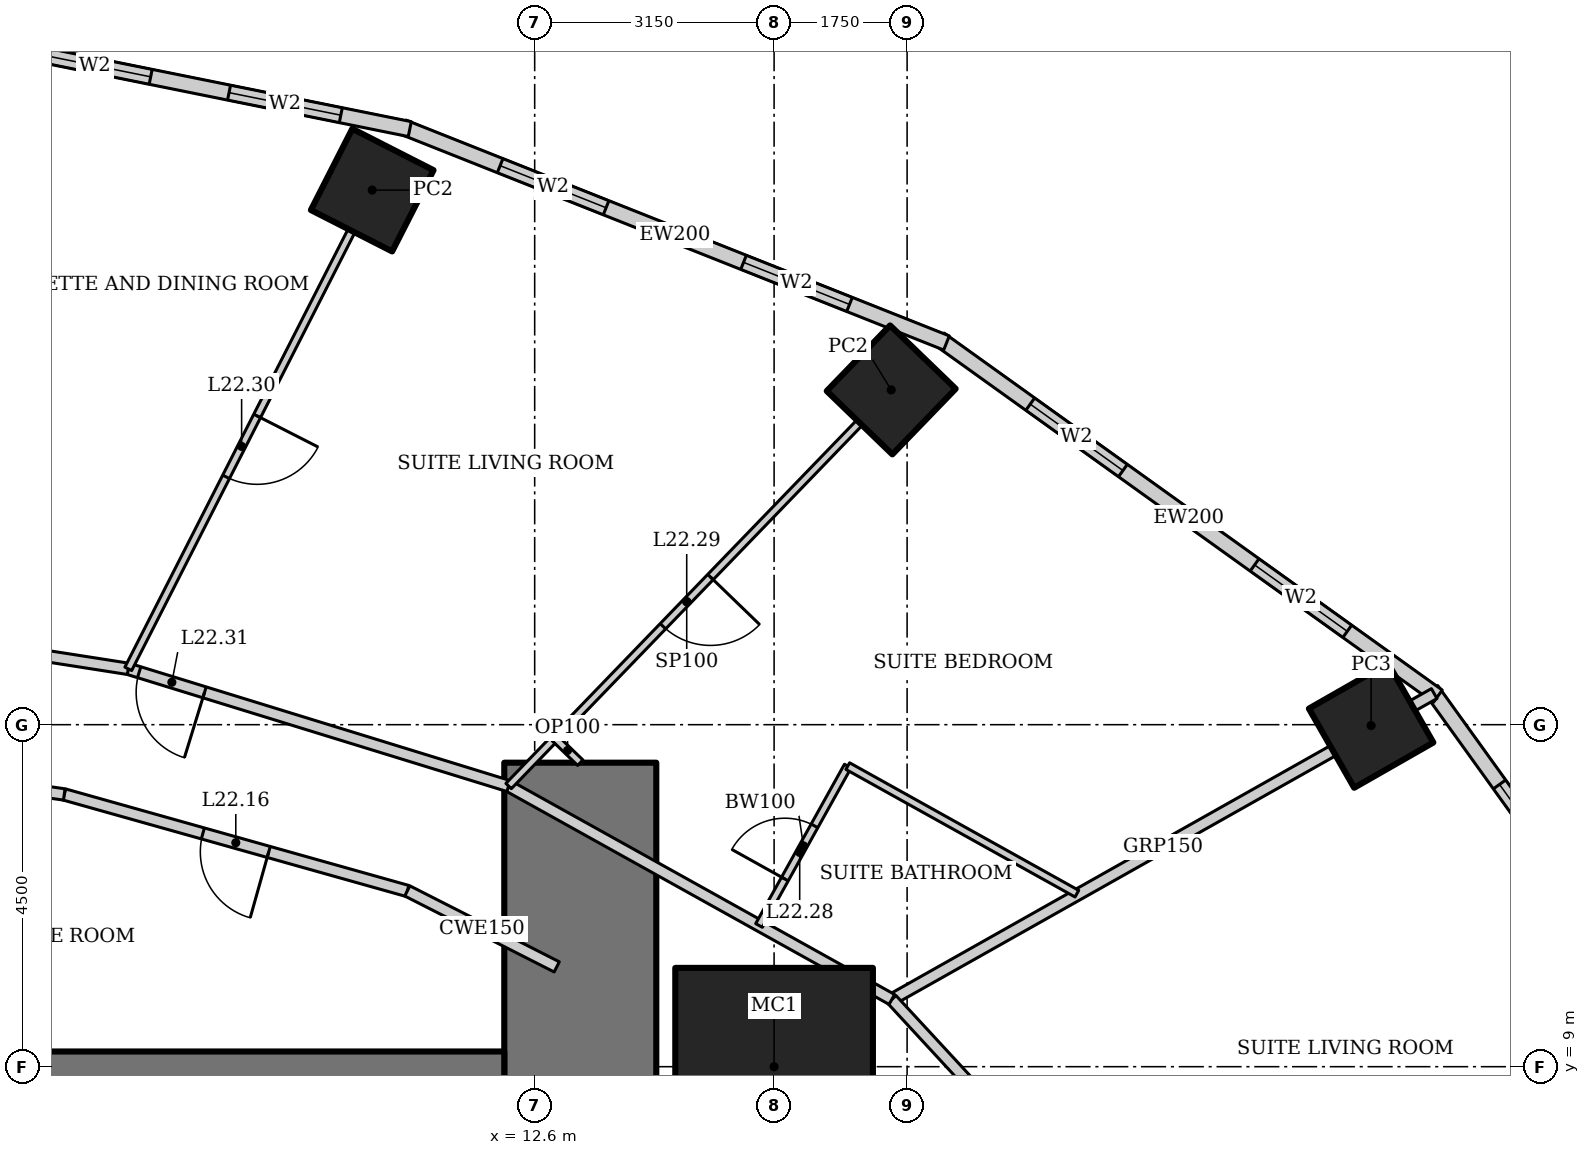
"""IFC4 building model, lengths in metres.
Left out: names, types, materials, properties, quantities, classifications, styles, units other than length and angle.
Written with IfcOpenShell. Run it as: python <this file> out.ifc"""

import sys

from ifc_helpers import new_model, si_unit, direction, frame, frame_2d, origin, origin_2d, place, context, subcontext, project, spatial, rectangle, hollow_rectangle, extrude, element, fill, save


model = new_model("IFC4")
c1 = context("Model", 3, precision=1e-05, world=origin(), true_north=direction((0.0, 1.0)))
c2 = subcontext(c1, "Body", "Model", "MODEL_VIEW")
j1 = project(units=[si_unit("LENGTHUNIT", "METRE"), si_unit("PLANEANGLEUNIT", "RADIAN")], contexts=[c1])
p1 = place(None, origin())
s1 = spatial("IfcSite", under=j1, at=p1, CompositionType="ELEMENT")
p2 = place(p1, origin())
s2 = spatial("IfcBuilding", under=s1, at=p2, CompositionType="ELEMENT")
p3 = place(p2, frame((0.0, 0.0, 94.6)))
s3 = spatial("IfcBuildingStorey", under=s2, at=p3, CompositionType="ELEMENT", Elevation=94.6)
p4 = place(p3, frame((15.75, 9.0, 0.0), z_axis=(0.0, 0.0, 1.0), x_axis=(1.0, 0.0, 0.0)))
e1 = element("IfcColumn", 1, at=p4, inside=s3, PredefinedType="COLUMN", context=c2, shape_type="SweptSolid", body=[
    extrude(hollow_rectangle(XDim=2.6, YDim=2.6, WallThickness=0.13, at=origin_2d()), origin(), (0.0, 0.0, 1.0), 3.6),
])
p5 = place(p3, frame((23.605, 13.489, 0.0), z_axis=(0.0, 0.0, 1.0), x_axis=(0.86824298017, 0.496139221777, 0.0)))
e2 = element("IfcColumn", 2, at=p5, inside=s3, PredefinedType="COLUMN", context=c2, shape_type="SweptSolid", body=[
    extrude(hollow_rectangle(XDim=1.2, YDim=1.2, WallThickness=0.12, at=origin_2d()), origin(), (0.0, 0.0, 1.0), 3.6),
])
for number, where, z_axis, x_axis in (
    (3, (17.291, 17.905, 0.0), (0.0, 0.0, 1.0), (0.695, 0.719, 0.0)),
    (4, (10.463, 20.534, 0.0), (0.0, 0.0, 1.0), (0.454, 0.891, 0.0)),
):
    element("IfcColumn", number, at=place(p3, frame(where, z_axis=z_axis, x_axis=x_axis)), inside=s3, PredefinedType="COLUMN", context=c2, shape_type="SweptSolid", body=[
        extrude(hollow_rectangle(XDim=1.2, YDim=1.2, WallThickness=0.1, at=origin_2d()), origin(), (0.0, 0.0, 1.0), 3.6),
    ])
p6 = place(p3, frame((13.2, -13.0, 0.0), z_axis=(0.0, 0.0, 1.0), x_axis=(0.0, 1.0, 0.0)))
e5 = element("IfcWall", 5, at=p6, inside=s3, PredefinedType="SHEAR", context=c2, shape_type="SweptSolid", body=[
    extrude(rectangle(XDim=26.0, YDim=2.0, at=frame_2d((13.0, 0.0))), origin(), (0.0, 0.0, 1.0), 3.6),
])
p7 = place(p6, frame((12.1, 0.0, 0.0)))
e6 = element("IfcOpeningElement", 6, at=p7, cuts=e5, PredefinedType="OPENING", context=c2, shape_type="SweptSolid", body=[
    extrude(rectangle(XDim=1.8, YDim=2.1, at=frame_2d((0.9, 1.05))), frame((0.0, 1.01, 0.0), z_axis=(0.0, -1.0, 0.0), x_axis=(1.0, 0.0, 0.0)), (0.0, 0.0, 1.0), 2.02),
])
p8 = place(p3, frame((12.2, 8.0, 0.0), z_axis=(0.0, 0.0, 1.0), x_axis=(-1.0, 0.0, 0.0)))
e7 = element("IfcWall", 7, at=p8, inside=s3, PredefinedType="SHEAR", context=c2, shape_type="SweptSolid", body=[
    extrude(rectangle(XDim=24.4, YDim=2.4, at=frame_2d((12.2, 0.0))), origin(), (0.0, 0.0, 1.0), 3.6),
])
p9 = place(p3, frame((29.26, 7.2, 0.0), z_axis=(0.0, 0.0, 1.0), x_axis=(-0.583937613703, 0.811798536155, 0.0)))
e8 = element("IfcWall", 8, at=p9, inside=s3, PredefinedType="SOLIDWALL", context=c2, shape_type="SweptSolid", body=[
    extrude(rectangle(XDim=8.323, YDim=0.2, at=frame_2d((4.162, 0.0))), origin(), (0.0, 0.0, 1.0), 3.45),
])
p10 = place(p9, frame((1.531, 0.0, 0.5)))
e9 = element("IfcOpeningElement", 9, at=p10, cuts=e8, PredefinedType="OPENING", context=c2, shape_type="SweptSolid", body=[
    extrude(rectangle(XDim=1.5, YDim=2.2, at=frame_2d((0.75, 1.1))), frame((0.0, 0.11, 0.0), z_axis=(0.0, -1.0, 0.0), x_axis=(1.0, 0.0, 0.0)), (0.0, 0.0, 1.0), 0.22),
])
p11 = place(p9, frame((5.292, 0.0, 0.5)))
e10 = element("IfcOpeningElement", 10, at=p11, cuts=e8, PredefinedType="OPENING", context=c2, shape_type="SweptSolid", body=[
    extrude(rectangle(XDim=1.5, YDim=2.2, at=frame_2d((0.75, 1.1))), frame((0.0, 0.11, 0.0), z_axis=(0.0, -1.0, 0.0), x_axis=(1.0, 0.0, 0.0)), (0.0, 0.0, 1.0), 0.22),
])
p12 = place(p3, frame((24.482, 13.875, 0.0), z_axis=(0.0, 0.0, 1.0), x_axis=(-0.812791321576, 0.582554948112, 0.0)))
e11 = element("IfcWall", 11, at=p12, inside=s3, PredefinedType="SOLIDWALL", context=c2, shape_type="SweptSolid", body=[
    extrude(rectangle(XDim=8.063, YDim=0.2, at=frame_2d((4.032, 0.0))), origin(), (0.0, 0.0, 1.0), 3.45),
])
p13 = place(p12, frame((1.466, 0.0, 0.5)))
e12 = element("IfcOpeningElement", 12, at=p13, cuts=e11, PredefinedType="OPENING", context=c2, shape_type="SweptSolid", body=[
    extrude(rectangle(XDim=1.5, YDim=2.2, at=frame_2d((0.75, 1.1))), frame((0.0, 0.11, 0.0), z_axis=(0.0, -1.0, 0.0), x_axis=(1.0, 0.0, 0.0)), (0.0, 0.0, 1.0), 0.22),
])
p14 = place(p12, frame((5.097, 0.0, 0.5)))
e13 = element("IfcOpeningElement", 13, at=p14, cuts=e11, PredefinedType="OPENING", context=c2, shape_type="SweptSolid", body=[
    extrude(rectangle(XDim=1.5, YDim=2.2, at=frame_2d((0.75, 1.1))), frame((0.0, 0.11, 0.0), z_axis=(0.0, -1.0, 0.0), x_axis=(1.0, 0.0, 0.0)), (0.0, 0.0, 1.0), 0.22),
])
p15 = place(p3, frame((18.018, 18.523, 0.0), z_axis=(0.0, 0.0, 1.0), x_axis=(-0.929358351251, 0.369178892895, 0.0)))
e14 = element("IfcWall", 14, at=p15, inside=s3, PredefinedType="SOLIDWALL", context=c2, shape_type="SweptSolid", body=[
    extrude(rectangle(XDim=7.692, YDim=0.2, at=frame_2d((3.846, 0.0))), origin(), (0.0, 0.0, 1.0), 3.45),
])
p16 = place(p15, frame((1.373, 0.0, 0.5)))
e15 = element("IfcOpeningElement", 15, at=p16, cuts=e14, PredefinedType="OPENING", context=c2, shape_type="SweptSolid", body=[
    extrude(rectangle(XDim=1.5, YDim=2.2, at=frame_2d((0.75, 1.1))), frame((0.0, 0.11, 0.0), z_axis=(0.0, -1.0, 0.0), x_axis=(1.0, 0.0, 0.0)), (0.0, 0.0, 1.0), 0.22),
])
p17 = place(p15, frame((4.819, 0.0, 0.5)))
e16 = element("IfcOpeningElement", 16, at=p17, cuts=e14, PredefinedType="OPENING", context=c2, shape_type="SweptSolid", body=[
    extrude(rectangle(XDim=1.5, YDim=2.2, at=frame_2d((0.75, 1.1))), frame((0.0, 0.11, 0.0), z_axis=(0.0, -1.0, 0.0), x_axis=(1.0, 0.0, 0.0)), (0.0, 0.0, 1.0), 0.22),
])
p18 = place(p3, frame((10.957, 21.337, 0.0), z_axis=(0.0, 0.0, 1.0), x_axis=(-0.980251657452, 0.197754110105, 0.0)))
e17 = element("IfcWall", 17, at=p18, inside=s3, PredefinedType="SOLIDWALL", context=c2, shape_type="SweptSolid", body=[
    extrude(rectangle(XDim=5.904, YDim=0.2, at=frame_2d((2.952, 0.0))), origin(), (0.0, 0.0, 1.0), 3.45),
])
p19 = place(p18, frame((0.926, 0.0, 0.5)))
e18 = element("IfcOpeningElement", 18, at=p19, cuts=e17, PredefinedType="OPENING", context=c2, shape_type="SweptSolid", body=[
    extrude(rectangle(XDim=1.5, YDim=2.2, at=frame_2d((0.75, 1.1))), frame((0.0, 0.11, 0.0), z_axis=(0.0, -1.0, 0.0), x_axis=(1.0, 0.0, 0.0)), (0.0, 0.0, 1.0), 0.22),
])
p20 = place(p18, frame((3.478, 0.0, 0.5)))
e19 = element("IfcOpeningElement", 19, at=p20, cuts=e17, PredefinedType="OPENING", context=c2, shape_type="SweptSolid", body=[
    extrude(rectangle(XDim=1.5, YDim=2.2, at=frame_2d((0.75, 1.1))), frame((0.0, 0.11, 0.0), z_axis=(0.0, -1.0, 0.0), x_axis=(1.0, 0.0, 0.0)), (0.0, 0.0, 1.0), 0.22),
])
p21 = place(p3, frame((24.435, 13.909, 0.0), z_axis=(0.0, 0.0, 1.0), x_axis=(-0.871075246657, -0.491149584813, 0.0)))
e20 = element("IfcWall", 20, at=p21, inside=s3, PredefinedType="PARTITIONING", context=c2, shape_type="SweptSolid", body=[
    extrude(rectangle(XDim=8.192, YDim=0.15, at=frame_2d((4.096, 0.0))), origin(), (0.0, 0.0, 1.0), 2.693),
])
p22 = place(p3, frame((21.484, 5.356, 0.0), z_axis=(0.0, 0.0, 1.0), x_axis=(-0.678641806296, 0.734469399463, 0.0)))
e21 = element("IfcWall", 21, at=p22, inside=s3, PredefinedType="PARTITIONING", context=c2, shape_type="SweptSolid", body=[
    extrude(rectangle(XDim=6.166, YDim=0.15, at=frame_2d((3.083, 0.0))), origin(), (0.0, 0.0, 1.0), 3.45),
])
p23 = place(p22, frame((0.15, 0.0, 0.0)))
e22 = element("IfcOpeningElement", 22, at=p23, cuts=e21, PredefinedType="OPENING", context=c2, shape_type="SweptSolid", body=[
    extrude(rectangle(XDim=0.9, YDim=2.1, at=frame_2d((0.45, 1.05))), frame((0.0, 0.085, 0.0), z_axis=(0.0, -1.0, 0.0), x_axis=(1.0, 0.0, 0.0)), (0.0, 0.0, 1.0), 0.17),
])
p24 = place(p3, frame((17.299, 9.885, 0.0), z_axis=(0.0, 0.0, 1.0), x_axis=(-0.873695910579, 0.486472461541, 0.0)))
e23 = element("IfcWall", 23, at=p24, inside=s3, PredefinedType="PARTITIONING", context=c2, shape_type="SweptSolid", body=[
    extrude(rectangle(XDim=5.771, YDim=0.15, at=frame_2d((2.885, 0.0))), origin(), (0.0, 0.0, 1.0), 3.45),
])
p25 = place(p3, frame((12.257, 12.693, 0.0), z_axis=(0.0, 0.0, 1.0), x_axis=(-0.955657956744, 0.294478980085, 0.0)))
e24 = element("IfcWall", 24, at=p25, inside=s3, PredefinedType="PARTITIONING", context=c2, shape_type="SweptSolid", body=[
    extrude(rectangle(XDim=5.236, YDim=0.15, at=frame_2d((2.618, 0.0))), origin(), (0.0, 0.0, 1.0), 3.45),
])
p26 = place(p25, frame((4.186, 0.0, 0.0)))
e25 = element("IfcOpeningElement", 25, at=p26, cuts=e24, PredefinedType="OPENING", context=c2, shape_type="SweptSolid", body=[
    extrude(rectangle(XDim=0.9, YDim=2.1, at=frame_2d((0.45, 1.05))), frame((0.0, 0.085, 0.0), z_axis=(0.0, -1.0, 0.0), x_axis=(1.0, 0.0, 0.0)), (0.0, 0.0, 1.0), 0.17),
])
p27 = place(p3, frame((7.253, 14.235, 0.0), z_axis=(0.0, 0.0, 1.0), x_axis=(-0.988015036573, 0.154357660987, 0.0)))
e26 = element("IfcWall", 26, at=p27, inside=s3, PredefinedType="PARTITIONING", context=c2, shape_type="SweptSolid", body=[
    extrude(rectangle(XDim=3.875, YDim=0.15, at=frame_2d((1.938, 0.0))), origin(), (0.0, 0.0, 1.0), 3.45),
])
p28 = place(p3, frame((10.924, 11.312, 0.0), z_axis=(0.0, 0.0, 1.0), x_axis=(-0.962643729928, 0.270771211967, 0.0)))
e27 = element("IfcWall", 27, at=p28, inside=s3, PredefinedType="PARTITIONING", context=c2, shape_type="SweptSolid", body=[
    extrude(rectangle(XDim=4.688, YDim=0.15, at=frame_2d((2.344, 0.0))), origin(), (0.0, 0.0, 1.0), 3.45),
])
p29 = place(p28, frame((1.894, 0.0, 0.0)))
e28 = element("IfcOpeningElement", 28, at=p29, cuts=e27, PredefinedType="OPENING", context=c2, shape_type="SweptSolid", body=[
    extrude(rectangle(XDim=0.9, YDim=2.1, at=frame_2d((0.45, 1.05))), frame((0.0, 0.085, 0.0), z_axis=(0.0, -1.0, 0.0), x_axis=(1.0, 0.0, 0.0)), (0.0, 0.0, 1.0), 0.17),
])
p30 = place(p3, frame((6.411, 12.582, 0.0), z_axis=(0.0, 0.0, 1.0), x_axis=(-0.990002114939, 0.14105251652, 0.0)))
e29 = element("IfcWall", 29, at=p30, inside=s3, PredefinedType="PARTITIONING", context=c2, shape_type="SweptSolid", body=[
    extrude(rectangle(XDim=3.429, YDim=0.15, at=frame_2d((1.714, 0.0))), origin(), (0.0, 0.0, 1.0), 3.45),
])
p31 = place(p3, frame((15.552, 10.858, 0.0), z_axis=(0.0, 0.0, 1.0), x_axis=(0.486445964861, 0.873710663361, 0.0)))
e30 = element("IfcWall", 30, at=p31, inside=s3, PredefinedType="PARTITIONING", context=c2, shape_type="SweptSolid", body=[
    extrude(rectangle(XDim=2.4, YDim=0.1, at=frame_2d((1.2, 0.0))), origin(), (0.0, 0.0, 1.0), 3.45),
])
p32 = place(p31, frame((0.7, 0.0, 0.0)))
e31 = element("IfcOpeningElement", 31, at=p32, cuts=e30, PredefinedType="OPENING", context=c2, shape_type="SweptSolid", body=[
    extrude(rectangle(XDim=0.8, YDim=2.1, at=frame_2d((0.4, 1.05))), frame((0.0, 0.06, 0.0), z_axis=(0.0, -1.0, 0.0), x_axis=(1.0, 0.0, 0.0)), (0.0, 0.0, 1.0), 0.12),
])
p33 = place(p3, frame((16.719, 12.955, 0.0), z_axis=(0.0, 0.0, 1.0), x_axis=(0.873676251648, -0.486507766953, 0.0)))
e32 = element("IfcWall", 32, at=p33, inside=s3, PredefinedType="PARTITIONING", context=c2, shape_type="SweptSolid", body=[
    extrude(rectangle(XDim=3.45, YDim=0.1, at=frame_2d((1.725, 0.0))), origin(), (0.0, 0.0, 1.0), 3.45),
])
p34 = place(p3, frame((16.944, 17.545, 0.0), z_axis=(0.0, 0.0, 1.0), x_axis=(-0.694677175107, -0.719321640426, 0.0)))
e33 = element("IfcWall", 33, at=p34, inside=s3, PredefinedType="PARTITIONING", context=c2, shape_type="SweptSolid", body=[
    extrude(rectangle(XDim=6.746, YDim=0.1, at=frame_2d((3.373, 0.0))), origin(), (0.0, 0.0, 1.0), 2.528),
])
p35 = place(p34, frame((2.923, 0.0, 0.0)))
e34 = element("IfcOpeningElement", 34, at=p35, cuts=e33, PredefinedType="OPENING", context=c2, shape_type="SweptSolid", body=[
    extrude(rectangle(XDim=0.9, YDim=2.1, at=frame_2d((0.45, 1.05))), frame((0.0, 0.06, 0.0), z_axis=(0.0, -1.0, 0.0), x_axis=(1.0, 0.0, 0.0)), (0.0, 0.0, 1.0), 0.12),
])
p36 = place(p3, frame((10.236, 20.088, 0.0), z_axis=(0.0, 0.0, 1.0), x_axis=(-0.453993694696, -0.89100489627, 0.0)))
e35 = element("IfcWall", 35, at=p36, inside=s3, PredefinedType="PARTITIONING", context=c2, shape_type="SweptSolid", body=[
    extrude(rectangle(XDim=6.57, YDim=0.1, at=frame_2d((3.285, 0.0))), origin(), (0.0, 0.0, 1.0), 2.528),
])
p37 = place(p36, frame((2.835, 0.0, 0.0)))
e36 = element("IfcOpeningElement", 36, at=p37, cuts=e35, PredefinedType="OPENING", context=c2, shape_type="SweptSolid", body=[
    extrude(rectangle(XDim=0.9, YDim=2.1, at=frame_2d((0.45, 1.05))), frame((0.0, 0.06, 0.0), z_axis=(0.0, -1.0, 0.0), x_axis=(1.0, 0.0, 0.0)), (0.0, 0.0, 1.0), 0.12),
])
p38 = place(p3, frame((13.2, 13.0, 0.0), z_axis=(0.0, 0.0, 1.0), x_axis=(-0.719347134512, 0.69465077562, 0.0)))
e37 = element("IfcWall", 37, at=p38, inside=s3, PredefinedType="PARTITIONING", context=c2, shape_type="SweptSolid", body=[
    extrude(rectangle(XDim=0.465, YDim=0.1, at=frame_2d((0.232, 0.0))), origin(), (0.0, 0.0, 1.0), 3.45),
])
p39 = place(p3, frame((12.89, 10.313, 0.0), z_axis=(0.0, 0.0, 1.0), x_axis=(-0.891372999417, 0.453270532805, 0.0)))
e38 = element("IfcWall", 38, at=p39, inside=s3, PredefinedType="PARTITIONING", context=c2, shape_type="SweptSolid", body=[
    extrude(rectangle(XDim=2.205, YDim=0.15, at=frame_2d((1.103, 0.0))), origin(), (0.0, 0.0, 1.0), 3.45),
])
p40 = place(p11, origin())
e39 = element("IfcWindow", 39, at=p40, inside=s3, PartitioningType="SINGLE_PANEL", PredefinedType="WINDOW", context=c2, shape_type="SweptSolid", body=[
    extrude(rectangle(XDim=1.5, YDim=2.2, at=frame_2d((0.75, 1.1))), frame((0.0, 0.03, 0.0), z_axis=(0.0, -1.0, 0.0), x_axis=(1.0, 0.0, 0.0)), (0.0, 0.0, 1.0), 0.06),
])
fill(e10, e39)
p41 = place(p13, origin())
e40 = element("IfcWindow", 40, at=p41, inside=s3, PartitioningType="SINGLE_PANEL", PredefinedType="WINDOW", context=c2, shape_type="SweptSolid", body=[
    extrude(rectangle(XDim=1.5, YDim=2.2, at=frame_2d((0.75, 1.1))), frame((0.0, 0.03, 0.0), z_axis=(0.0, -1.0, 0.0), x_axis=(1.0, 0.0, 0.0)), (0.0, 0.0, 1.0), 0.06),
])
fill(e12, e40)
p42 = place(p14, origin())
e41 = element("IfcWindow", 41, at=p42, inside=s3, PartitioningType="SINGLE_PANEL", PredefinedType="WINDOW", context=c2, shape_type="SweptSolid", body=[
    extrude(rectangle(XDim=1.5, YDim=2.2, at=frame_2d((0.75, 1.1))), frame((0.0, 0.03, 0.0), z_axis=(0.0, -1.0, 0.0), x_axis=(1.0, 0.0, 0.0)), (0.0, 0.0, 1.0), 0.06),
])
fill(e13, e41)
p43 = place(p16, origin())
e42 = element("IfcWindow", 42, at=p43, inside=s3, PartitioningType="SINGLE_PANEL", PredefinedType="WINDOW", context=c2, shape_type="SweptSolid", body=[
    extrude(rectangle(XDim=1.5, YDim=2.2, at=frame_2d((0.75, 1.1))), frame((0.0, 0.03, 0.0), z_axis=(0.0, -1.0, 0.0), x_axis=(1.0, 0.0, 0.0)), (0.0, 0.0, 1.0), 0.06),
])
fill(e15, e42)
p44 = place(p17, origin())
e43 = element("IfcWindow", 43, at=p44, inside=s3, PartitioningType="SINGLE_PANEL", PredefinedType="WINDOW", context=c2, shape_type="SweptSolid", body=[
    extrude(rectangle(XDim=1.5, YDim=2.2, at=frame_2d((0.75, 1.1))), frame((0.0, 0.03, 0.0), z_axis=(0.0, -1.0, 0.0), x_axis=(1.0, 0.0, 0.0)), (0.0, 0.0, 1.0), 0.06),
])
fill(e16, e43)
p45 = place(p19, origin())
e44 = element("IfcWindow", 44, at=p45, inside=s3, PartitioningType="SINGLE_PANEL", PredefinedType="WINDOW", context=c2, shape_type="SweptSolid", body=[
    extrude(rectangle(XDim=1.5, YDim=2.2, at=frame_2d((0.75, 1.1))), frame((0.0, 0.03, 0.0), z_axis=(0.0, -1.0, 0.0), x_axis=(1.0, 0.0, 0.0)), (0.0, 0.0, 1.0), 0.06),
])
fill(e18, e44)
p46 = place(p20, origin())
e45 = element("IfcWindow", 45, at=p46, inside=s3, PartitioningType="SINGLE_PANEL", PredefinedType="WINDOW", context=c2, shape_type="SweptSolid", body=[
    extrude(rectangle(XDim=1.5, YDim=2.2, at=frame_2d((0.75, 1.1))), frame((0.0, 0.03, 0.0), z_axis=(0.0, -1.0, 0.0), x_axis=(1.0, 0.0, 0.0)), (0.0, 0.0, 1.0), 0.06),
])
fill(e19, e45)
p47 = place(p29, origin())
e46 = element("IfcDoor", 46, at=p47, inside=s3, OperationType="SINGLE_SWING_LEFT", PredefinedType="DOOR", context=c2, shape_type="SweptSolid", body=[
    extrude(rectangle(XDim=0.9, YDim=2.1, at=frame_2d((0.45, 1.05))), frame((0.0, 0.025, 0.0), z_axis=(0.0, -1.0, 0.0), x_axis=(1.0, 0.0, 0.0)), (0.0, 0.0, 1.0), 0.05),
])
fill(e28, e46)
p48 = place(p32, origin())
e47 = element("IfcDoor", 47, at=p48, inside=s3, OperationType="SINGLE_SWING_LEFT", PredefinedType="DOOR", context=c2, shape_type="SweptSolid", body=[
    extrude(rectangle(XDim=0.8, YDim=2.1, at=frame_2d((0.4, 1.05))), frame((0.0, 0.025, 0.0), z_axis=(0.0, -1.0, 0.0), x_axis=(1.0, 0.0, 0.0)), (0.0, 0.0, 1.0), 0.05),
])
fill(e31, e47)
p49 = place(p35, origin())
e48 = element("IfcDoor", 48, at=p49, inside=s3, OperationType="SINGLE_SWING_LEFT", PredefinedType="DOOR", context=c2, shape_type="SweptSolid", body=[
    extrude(rectangle(XDim=0.9, YDim=2.1, at=frame_2d((0.45, 1.05))), frame((0.0, 0.025, 0.0), z_axis=(0.0, -1.0, 0.0), x_axis=(1.0, 0.0, 0.0)), (0.0, 0.0, 1.0), 0.05),
])
fill(e34, e48)
p50 = place(p37, origin())
e49 = element("IfcDoor", 49, at=p50, inside=s3, OperationType="SINGLE_SWING_LEFT", PredefinedType="DOOR", context=c2, shape_type="SweptSolid", body=[
    extrude(rectangle(XDim=0.9, YDim=2.1, at=frame_2d((0.45, 1.05))), frame((0.0, 0.025, 0.0), z_axis=(0.0, -1.0, 0.0), x_axis=(1.0, 0.0, 0.0)), (0.0, 0.0, 1.0), 0.05),
])
fill(e36, e49)
p51 = place(p26, origin())
e50 = element("IfcDoor", 50, at=p51, inside=s3, OperationType="SINGLE_SWING_LEFT", PredefinedType="DOOR", context=c2, shape_type="SweptSolid", body=[
    extrude(rectangle(XDim=0.9, YDim=2.1, at=frame_2d((0.45, 1.05))), frame((0.0, 0.025, 0.0), z_axis=(0.0, -1.0, 0.0), x_axis=(1.0, 0.0, 0.0)), (0.0, 0.0, 1.0), 0.05),
])
fill(e25, e50)
save(model, sys.argv[1])
